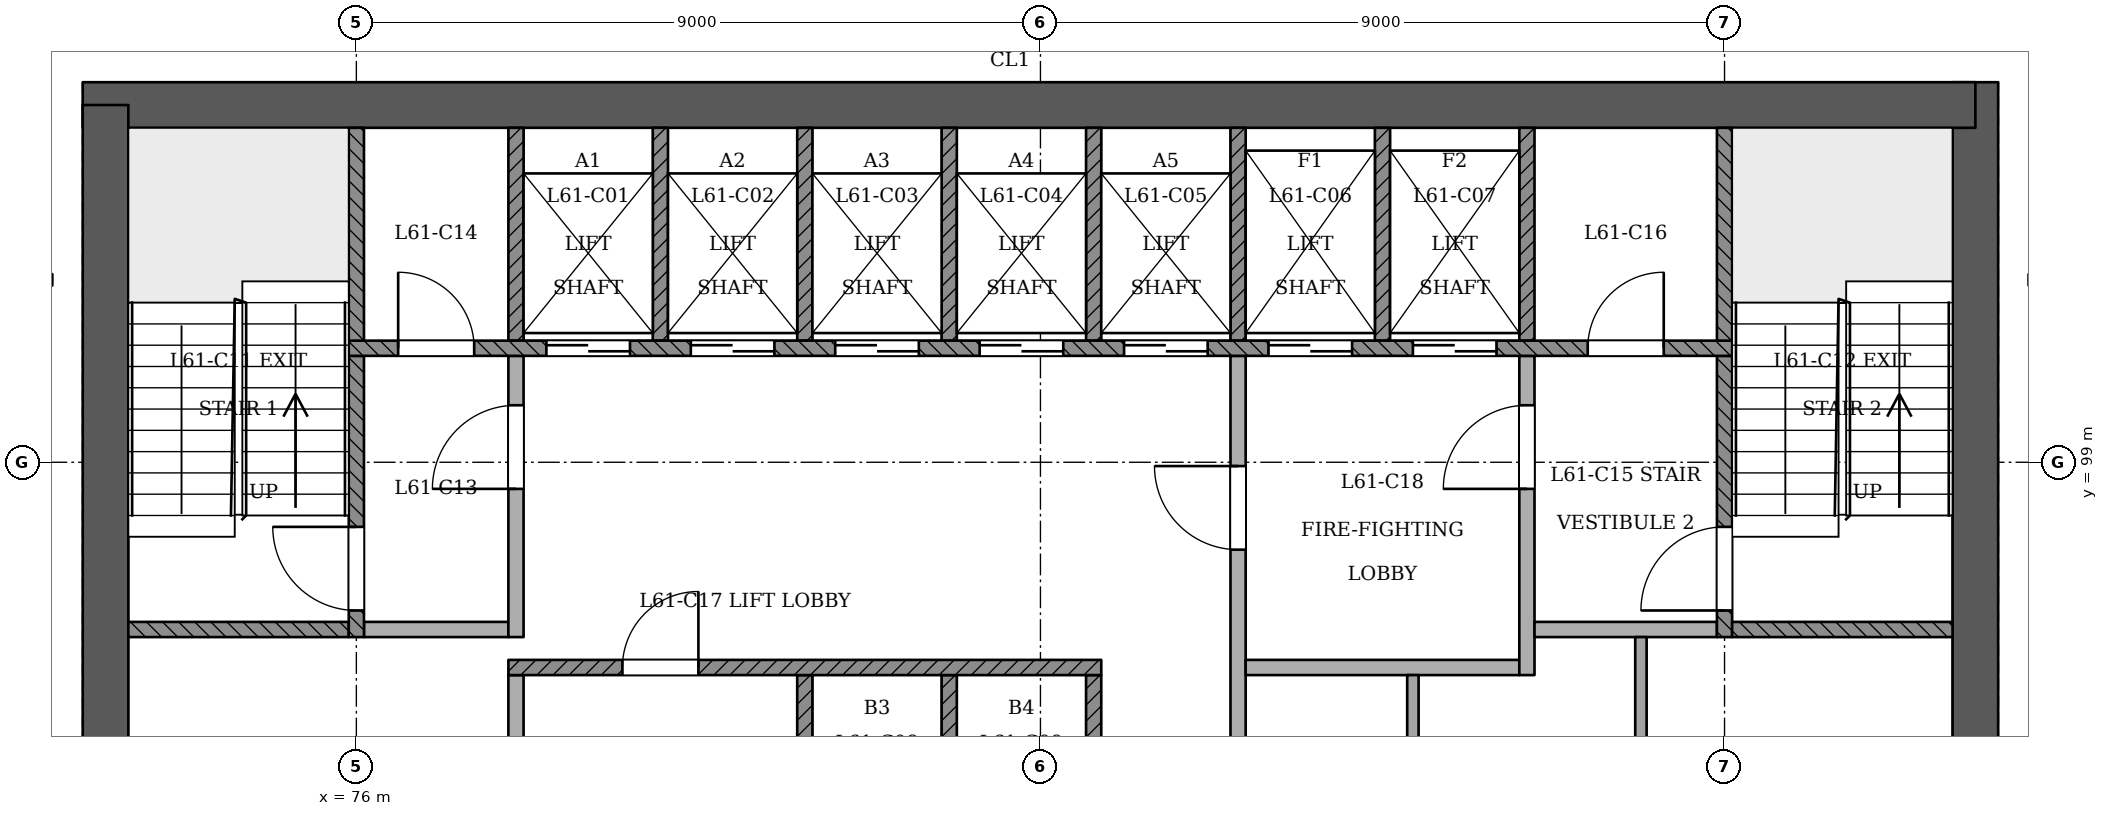
"""IFC4 building model, lengths in metres.
Left out: names, types, materials, properties, quantities, classifications, styles, units other than length and angle.
Written with IfcOpenShell. Run it as: python <this file> out.ifc"""

import sys

from ifc_helpers import new_model, si_unit, direction, frame, frame_2d, origin, place, context, subcontext, project, spatial, rectangle, extrude, element, fill, save


model = new_model("IFC4")
c1 = context("Model", 3, precision=1e-05, world=origin(), true_north=direction((0.0, 1.0)))
c2 = subcontext(c1, "Body", "Model", "MODEL_VIEW")
j1 = project(units=[si_unit("LENGTHUNIT", "METRE"), si_unit("PLANEANGLEUNIT", "RADIAN")], contexts=[c1])
p1 = place(None, origin())
s1 = spatial("IfcSite", under=j1, at=p1, CompositionType="ELEMENT")
p2 = place(p1, origin())
s2 = spatial("IfcBuilding", under=s1, at=p2, CompositionType="ELEMENT")
p3 = place(p2, frame((0.0, 0.0, 239.2)))
s3 = spatial("IfcBuildingStorey", under=s2, at=p3, CompositionType="ELEMENT", Elevation=239.2)
p4 = place(p3, frame((97.3, 93.1, 0.0), z_axis=(0.0, 0.0, 1.0), x_axis=(0.0, 1.0, 0.0)))
e1 = element("IfcWall", 1, at=p4, inside=s3, PredefinedType="SHEAR", context=c2, shape_type="SweptSolid", body=[
    extrude(rectangle(XDim=10.9, YDim=0.6, at=frame_2d((5.45, 0.0))), origin(), (0.0, 0.0, 1.0), 3.6),
])
p5 = place(p3, frame((97.3, 103.7, 0.0), z_axis=(0.0, 0.0, 1.0), x_axis=(-1.0, 0.0, 0.0)))
e2 = element("IfcWall", 2, at=p5, inside=s3, PredefinedType="SHEAR", context=c2, shape_type="SweptSolid", body=[
    extrude(rectangle(XDim=24.9, YDim=0.6, at=frame_2d((12.45, 0.0))), origin(), (0.0, 0.0, 1.0), 3.6),
])
p6 = place(p3, frame((72.7, 103.7, 0.0), z_axis=(0.0, 0.0, 1.0), x_axis=(0.0, -1.0, 0.0)))
e3 = element("IfcWall", 3, at=p6, inside=s3, PredefinedType="SHEAR", context=c2, shape_type="SweptSolid", body=[
    extrude(rectangle(XDim=10.9, YDim=0.6, at=frame_2d((5.45, 0.0))), origin(), (0.0, 0.0, 1.0), 3.6),
])
p7 = place(p3, frame((72.0, 101.4, 0.0), z_axis=(0.0, 0.0, 1.0), x_axis=(-1.0, 0.0, 0.0)))
e4 = element("IfcWall", 4, at=p7, inside=s3, PredefinedType="PARTITIONING", context=c2, shape_type="SweptSolid", body=[
    extrude(rectangle(XDim=1.8, YDim=0.15, at=frame_2d((0.9, 0.0))), origin(), (0.0, 0.0, 1.0), 3.2),
])
p8 = place(p3, frame((78.1, 93.4, 0.0), z_axis=(0.0, 0.0, 1.0), x_axis=(0.0, 1.0, 0.0)))
e5 = element("IfcWall", 5, at=p8, inside=s3, PredefinedType="PARTITIONING", context=c2, shape_type="SweptSolid", body=[
    extrude(rectangle(XDim=2.8, YDim=0.2, at=frame_2d((1.4, 0.0))), origin(), (0.0, 0.0, 1.0), 3.2),
])
for number, where, z_axis, x_axis in (
    (6, (81.9, 93.4, 0.0), (0.0, 0.0, 1.0), (0.0, 1.0, 0.0)),
    (7, (83.8, 93.4, 0.0), (0.0, 0.0, 1.0), (0.0, 1.0, 0.0)),
    (8, (85.7, 93.4, 0.0), (0.0, 0.0, 1.0), (0.0, 1.0, 0.0)),
):
    element("IfcWall", number, at=place(p3, frame(where, z_axis=z_axis, x_axis=x_axis)), inside=s3, PredefinedType="SOLIDWALL", context=c2, shape_type="SweptSolid", body=[
        extrude(rectangle(XDim=2.8, YDim=0.2, at=frame_2d((1.4, 0.0))), origin(), (0.0, 0.0, 1.0), 3.2),
    ])
p9 = place(p3, frame((87.6, 93.4, 0.0), z_axis=(0.0, 0.0, 1.0), x_axis=(0.0, 1.0, 0.0)))
e9 = element("IfcWall", 9, at=p9, inside=s3, PredefinedType="PARTITIONING", context=c2, shape_type="SweptSolid", body=[
    extrude(rectangle(XDim=7.0, YDim=0.2, at=frame_2d((3.5, 0.0))), origin(), (0.0, 0.0, 1.0), 3.2),
])
p10 = place(p9, frame((4.45, 0.0, 0.0)))
e10 = element("IfcOpeningElement", 10, at=p10, cuts=e9, PredefinedType="OPENING", context=c2, shape_type="SweptSolid", body=[
    extrude(rectangle(XDim=1.1, YDim=2.1, at=frame_2d((0.55, 1.05))), frame((0.0, 0.11, 0.0), z_axis=(0.0, -1.0, 0.0), x_axis=(1.0, 0.0, 0.0)), (0.0, 0.0, 1.0), 0.221),
])
p11 = place(p3, frame((89.9, 93.4, 0.0), z_axis=(0.0, 0.0, 1.0), x_axis=(0.0, 1.0, 0.0)))
e11 = element("IfcWall", 11, at=p11, inside=s3, PredefinedType="PARTITIONING", context=c2, shape_type="SweptSolid", body=[
    extrude(rectangle(XDim=2.8, YDim=0.15, at=frame_2d((1.4, 0.0))), origin(), (0.0, 0.0, 1.0), 3.2),
])
p12 = place(p3, frame((92.9, 93.4, 0.0), z_axis=(0.0, 0.0, 1.0), x_axis=(0.0, 1.0, 0.0)))
e12 = element("IfcWall", 12, at=p12, inside=s3, PredefinedType="PARTITIONING", context=c2, shape_type="SweptSolid", body=[
    extrude(rectangle(XDim=3.3, YDim=0.15, at=frame_2d((1.65, 0.0))), origin(), (0.0, 0.0, 1.0), 3.2),
])
p13 = place(p3, frame((78.0, 96.3, 0.0), z_axis=(0.0, 0.0, 1.0), x_axis=(1.0, 0.0, 0.0)))
e13 = element("IfcWall", 13, at=p13, inside=s3, PredefinedType="SOLIDWALL", context=c2, shape_type="SweptSolid", body=[
    extrude(rectangle(XDim=7.8, YDim=0.2, at=frame_2d((3.9, 0.0))), origin(), (0.0, 0.0, 1.0), 3.2),
])
p14 = place(p13, frame((1.5, 0.0, 0.0)))
e14 = element("IfcOpeningElement", 14, at=p14, cuts=e13, PredefinedType="OPENING", context=c2, shape_type="SweptSolid", body=[
    extrude(rectangle(XDim=1.0, YDim=2.1, at=frame_2d((0.5, 1.05))), frame((0.0, 0.11, 0.0), z_axis=(0.0, -1.0, 0.0), x_axis=(1.0, 0.0, 0.0)), (0.0, 0.0, 1.0), 0.221),
])
p15 = place(p3, frame((87.7, 96.3, 0.0), z_axis=(0.0, 0.0, 1.0), x_axis=(1.0, 0.0, 0.0)))
e15 = element("IfcWall", 15, at=p15, inside=s3, PredefinedType="PARTITIONING", context=c2, shape_type="SweptSolid", body=[
    extrude(rectangle(XDim=3.6, YDim=0.2, at=frame_2d((1.8, 0.0))), origin(), (0.0, 0.0, 1.0), 3.2),
])
p16 = place(p3, frame((91.4, 96.2, 0.0), z_axis=(0.0, 0.0, 1.0), x_axis=(0.0, 1.0, 0.0)))
e16 = element("IfcWall", 16, at=p16, inside=s3, PredefinedType="PARTITIONING", context=c2, shape_type="SweptSolid", body=[
    extrude(rectangle(XDim=4.2, YDim=0.2, at=frame_2d((2.1, 0.0))), origin(), (0.0, 0.0, 1.0), 3.2),
])
p17 = place(p16, frame((2.45, 0.0, 0.0)))
e17 = element("IfcOpeningElement", 17, at=p17, cuts=e16, PredefinedType="OPENING", context=c2, shape_type="SweptSolid", body=[
    extrude(rectangle(XDim=1.1, YDim=2.1, at=frame_2d((0.55, 1.05))), frame((0.0, 0.11, 0.0), z_axis=(0.0, -1.0, 0.0), x_axis=(1.0, 0.0, 0.0)), (0.0, 0.0, 1.0), 0.221),
])
p18 = place(p3, frame((73.0, 96.8, 0.0), z_axis=(0.0, 0.0, 1.0), x_axis=(1.0, 0.0, 0.0)))
e18 = element("IfcWall", 18, at=p18, inside=s3, PredefinedType="SOLIDWALL", context=c2, shape_type="SweptSolid", body=[
    extrude(rectangle(XDim=2.9, YDim=0.2, at=frame_2d((1.45, 0.0))), origin(), (0.0, 0.0, 1.0), 3.2),
])
p19 = place(p3, frame((76.0, 96.7, 0.0), z_axis=(0.0, 0.0, 1.0), x_axis=(0.0, 1.0, 0.0)))
e19 = element("IfcWall", 19, at=p19, inside=s3, PredefinedType="SOLIDWALL", context=c2, shape_type="SweptSolid", body=[
    extrude(rectangle(XDim=3.7, YDim=0.2, at=frame_2d((1.85, 0.0))), origin(), (0.0, 0.0, 1.0), 3.2),
])
p20 = place(p19, frame((0.35, 0.0, 0.0)))
e20 = element("IfcOpeningElement", 20, at=p20, cuts=e19, PredefinedType="OPENING", context=c2, shape_type="SweptSolid", body=[
    extrude(rectangle(XDim=1.1, YDim=2.1, at=frame_2d((0.55, 1.05))), frame((0.0, 0.11, 0.0), z_axis=(0.0, -1.0, 0.0), x_axis=(1.0, 0.0, 0.0)), (0.0, 0.0, 1.0), 0.221),
])
p21 = place(p3, frame((76.1, 96.8, 0.0), z_axis=(0.0, 0.0, 1.0), x_axis=(1.0, 0.0, 0.0)))
e21 = element("IfcWall", 21, at=p21, inside=s3, PredefinedType="PARTITIONING", context=c2, shape_type="SweptSolid", body=[
    extrude(rectangle(XDim=1.9, YDim=0.2, at=frame_2d((0.95, 0.0))), origin(), (0.0, 0.0, 1.0), 3.2),
])
p22 = place(p3, frame((78.1, 96.7, 0.0), z_axis=(0.0, 0.0, 1.0), x_axis=(0.0, 1.0, 0.0)))
e22 = element("IfcWall", 22, at=p22, inside=s3, PredefinedType="PARTITIONING", context=c2, shape_type="SweptSolid", body=[
    extrude(rectangle(XDim=3.7, YDim=0.2, at=frame_2d((1.85, 0.0))), origin(), (0.0, 0.0, 1.0), 3.2),
])
p23 = place(p22, frame((1.95, 0.0, 0.0)))
e23 = element("IfcOpeningElement", 23, at=p23, cuts=e22, PredefinedType="OPENING", context=c2, shape_type="SweptSolid", body=[
    extrude(rectangle(XDim=1.1, YDim=2.1, at=frame_2d((0.55, 1.05))), frame((0.0, 0.11, 0.0), z_axis=(0.0, -1.0, 0.0), x_axis=(1.0, 0.0, 0.0)), (0.0, 0.0, 1.0), 0.221),
])
p24 = place(p3, frame((91.5, 96.8, 0.0), z_axis=(0.0, 0.0, 1.0), x_axis=(1.0, 0.0, 0.0)))
e24 = element("IfcWall", 24, at=p24, inside=s3, PredefinedType="PARTITIONING", context=c2, shape_type="SweptSolid", body=[
    extrude(rectangle(XDim=2.4, YDim=0.2, at=frame_2d((1.2, 0.0))), origin(), (0.0, 0.0, 1.0), 3.2),
])
p25 = place(p3, frame((94.0, 96.7, 0.0), z_axis=(0.0, 0.0, 1.0), x_axis=(0.0, 1.0, 0.0)))
e25 = element("IfcWall", 25, at=p25, inside=s3, PredefinedType="SOLIDWALL", context=c2, shape_type="SweptSolid", body=[
    extrude(rectangle(XDim=3.7, YDim=0.2, at=frame_2d((1.85, 0.0))), origin(), (0.0, 0.0, 1.0), 3.2),
])
p26 = place(p25, frame((0.35, 0.0, 0.0)))
e26 = element("IfcOpeningElement", 26, at=p26, cuts=e25, PredefinedType="OPENING", context=c2, shape_type="SweptSolid", body=[
    extrude(rectangle(XDim=1.1, YDim=2.1, at=frame_2d((0.55, 1.05))), frame((0.0, 0.11, 0.0), z_axis=(0.0, -1.0, 0.0), x_axis=(1.0, 0.0, 0.0)), (0.0, 0.0, 1.0), 0.221),
])
p27 = place(p3, frame((94.1, 96.8, 0.0), z_axis=(0.0, 0.0, 1.0), x_axis=(1.0, 0.0, 0.0)))
e27 = element("IfcWall", 27, at=p27, inside=s3, PredefinedType="SOLIDWALL", context=c2, shape_type="SweptSolid", body=[
    extrude(rectangle(XDim=2.9, YDim=0.2, at=frame_2d((1.45, 0.0))), origin(), (0.0, 0.0, 1.0), 3.2),
])
p28 = place(p3, frame((75.9, 100.5, 0.0), z_axis=(0.0, 0.0, 1.0), x_axis=(1.0, 0.0, 0.0)))
e28 = element("IfcWall", 28, at=p28, inside=s3, PredefinedType="SOLIDWALL", context=c2, shape_type="SweptSolid", body=[
    extrude(rectangle(XDim=18.2, YDim=0.2, at=frame_2d((9.1, 0.0))), origin(), (0.0, 0.0, 1.0), 3.2),
])
p29 = place(p28, frame((2.6, 0.0, 0.0)))
e29 = element("IfcOpeningElement", 29, at=p29, cuts=e28, PredefinedType="OPENING", context=c2, shape_type="SweptSolid", body=[
    extrude(rectangle(XDim=1.1, YDim=2.1, at=frame_2d((0.55, 1.05))), frame((0.0, 0.11, 0.0), z_axis=(0.0, -1.0, 0.0), x_axis=(1.0, 0.0, 0.0)), (0.0, 0.0, 1.0), 0.221),
])
p30 = place(p28, frame((4.5, 0.0, 0.0)))
e30 = element("IfcOpeningElement", 30, at=p30, cuts=e28, PredefinedType="OPENING", context=c2, shape_type="SweptSolid", body=[
    extrude(rectangle(XDim=1.1, YDim=2.1, at=frame_2d((0.55, 1.05))), frame((0.0, 0.11, 0.0), z_axis=(0.0, -1.0, 0.0), x_axis=(1.0, 0.0, 0.0)), (0.0, 0.0, 1.0), 0.221),
])
p31 = place(p28, frame((6.4, 0.0, 0.0)))
e31 = element("IfcOpeningElement", 31, at=p31, cuts=e28, PredefinedType="OPENING", context=c2, shape_type="SweptSolid", body=[
    extrude(rectangle(XDim=1.1, YDim=2.1, at=frame_2d((0.55, 1.05))), frame((0.0, 0.11, 0.0), z_axis=(0.0, -1.0, 0.0), x_axis=(1.0, 0.0, 0.0)), (0.0, 0.0, 1.0), 0.221),
])
p32 = place(p28, frame((8.3, 0.0, 0.0)))
e32 = element("IfcOpeningElement", 32, at=p32, cuts=e28, PredefinedType="OPENING", context=c2, shape_type="SweptSolid", body=[
    extrude(rectangle(XDim=1.1, YDim=2.1, at=frame_2d((0.55, 1.05))), frame((0.0, 0.11, 0.0), z_axis=(0.0, -1.0, 0.0), x_axis=(1.0, 0.0, 0.0)), (0.0, 0.0, 1.0), 0.221),
])
p33 = place(p28, frame((10.2, 0.0, 0.0)))
e33 = element("IfcOpeningElement", 33, at=p33, cuts=e28, PredefinedType="OPENING", context=c2, shape_type="SweptSolid", body=[
    extrude(rectangle(XDim=1.1, YDim=2.1, at=frame_2d((0.55, 1.05))), frame((0.0, 0.11, 0.0), z_axis=(0.0, -1.0, 0.0), x_axis=(1.0, 0.0, 0.0)), (0.0, 0.0, 1.0), 0.221),
])
p34 = place(p28, frame((12.1, 0.0, 0.0)))
e34 = element("IfcOpeningElement", 34, at=p34, cuts=e28, PredefinedType="OPENING", context=c2, shape_type="SweptSolid", body=[
    extrude(rectangle(XDim=1.1, YDim=2.1, at=frame_2d((0.55, 1.05))), frame((0.0, 0.11, 0.0), z_axis=(0.0, -1.0, 0.0), x_axis=(1.0, 0.0, 0.0)), (0.0, 0.0, 1.0), 0.221),
])
p35 = place(p28, frame((14.0, 0.0, 0.0)))
e35 = element("IfcOpeningElement", 35, at=p35, cuts=e28, PredefinedType="OPENING", context=c2, shape_type="SweptSolid", body=[
    extrude(rectangle(XDim=1.1, YDim=2.1, at=frame_2d((0.55, 1.05))), frame((0.0, 0.11, 0.0), z_axis=(0.0, -1.0, 0.0), x_axis=(1.0, 0.0, 0.0)), (0.0, 0.0, 1.0), 0.221),
])
p36 = place(p28, frame((0.65, 0.0, 0.0)))
e36 = element("IfcOpeningElement", 36, at=p36, cuts=e28, PredefinedType="OPENING", context=c2, shape_type="SweptSolid", body=[
    extrude(rectangle(XDim=1.0, YDim=2.1, at=frame_2d((0.5, 1.05))), frame((0.0, 0.11, 0.0), z_axis=(0.0, -1.0, 0.0), x_axis=(1.0, 0.0, 0.0)), (0.0, 0.0, 1.0), 0.221),
])
p37 = place(p28, frame((16.3, 0.0, 0.0)))
e37 = element("IfcOpeningElement", 37, at=p37, cuts=e28, PredefinedType="OPENING", context=c2, shape_type="SweptSolid", body=[
    extrude(rectangle(XDim=1.0, YDim=2.1, at=frame_2d((0.5, 1.05))), frame((0.0, 0.11, 0.0), z_axis=(0.0, -1.0, 0.0), x_axis=(1.0, 0.0, 0.0)), (0.0, 0.0, 1.0), 0.221),
])
for number, where, z_axis, x_axis in (
    (38, (76.0, 100.6, 0.0), (0.0, 0.0, 1.0), (0.0, 1.0, 0.0)),
    (39, (78.1, 100.6, 0.0), (0.0, 0.0, 1.0), (0.0, 1.0, 0.0)),
    (40, (80.0, 100.6, 0.0), (0.0, 0.0, 1.0), (0.0, 1.0, 0.0)),
    (41, (81.9, 100.6, 0.0), (0.0, 0.0, 1.0), (0.0, 1.0, 0.0)),
    (42, (83.8, 100.6, 0.0), (0.0, 0.0, 1.0), (0.0, 1.0, 0.0)),
    (43, (85.7, 100.6, 0.0), (0.0, 0.0, 1.0), (0.0, 1.0, 0.0)),
    (44, (87.6, 100.6, 0.0), (0.0, 0.0, 1.0), (0.0, 1.0, 0.0)),
    (45, (89.5, 100.6, 0.0), (0.0, 0.0, 1.0), (0.0, 1.0, 0.0)),
    (46, (91.4, 100.6, 0.0), (0.0, 0.0, 1.0), (0.0, 1.0, 0.0)),
    (47, (94.0, 100.6, 0.0), (0.0, 0.0, 1.0), (0.0, 1.0, 0.0)),
):
    element("IfcWall", number, at=place(p3, frame(where, z_axis=z_axis, x_axis=x_axis)), inside=s3, PredefinedType="SOLIDWALL", context=c2, shape_type="SweptSolid", body=[
        extrude(rectangle(XDim=2.8, YDim=0.2, at=frame_2d((1.4, 0.0))), origin(), (0.0, 0.0, 1.0), 3.2),
    ])
p38 = place(p29, origin())
e48 = element("IfcDoor", 48, at=p38, inside=s3, OperationType="SLIDING_TO_RIGHT", PredefinedType="NOTDEFINED", context=c2, shape_type="SweptSolid", body=[
    extrude(rectangle(XDim=1.1, YDim=2.1, at=frame_2d((0.55, 1.05))), frame((0.0, 0.025, 0.0), z_axis=(0.0, -1.0, 0.0), x_axis=(1.0, 0.0, 0.0)), (0.0, 0.0, 1.0), 0.05),
])
fill(e29, e48)
p39 = place(p30, origin())
e49 = element("IfcDoor", 49, at=p39, inside=s3, OperationType="SLIDING_TO_LEFT", PredefinedType="NOTDEFINED", context=c2, shape_type="SweptSolid", body=[
    extrude(rectangle(XDim=1.1, YDim=2.1, at=frame_2d((0.55, 1.05))), frame((0.0, 0.025, 0.0), z_axis=(0.0, -1.0, 0.0), x_axis=(1.0, 0.0, 0.0)), (0.0, 0.0, 1.0), 0.05),
])
fill(e30, e49)
p40 = place(p31, origin())
e50 = element("IfcDoor", 50, at=p40, inside=s3, OperationType="SLIDING_TO_RIGHT", PredefinedType="NOTDEFINED", context=c2, shape_type="SweptSolid", body=[
    extrude(rectangle(XDim=1.1, YDim=2.1, at=frame_2d((0.55, 1.05))), frame((0.0, 0.025, 0.0), z_axis=(0.0, -1.0, 0.0), x_axis=(1.0, 0.0, 0.0)), (0.0, 0.0, 1.0), 0.05),
])
fill(e31, e50)
p41 = place(p32, origin())
e51 = element("IfcDoor", 51, at=p41, inside=s3, OperationType="SLIDING_TO_LEFT", PredefinedType="NOTDEFINED", context=c2, shape_type="SweptSolid", body=[
    extrude(rectangle(XDim=1.1, YDim=2.1, at=frame_2d((0.55, 1.05))), frame((0.0, 0.025, 0.0), z_axis=(0.0, -1.0, 0.0), x_axis=(1.0, 0.0, 0.0)), (0.0, 0.0, 1.0), 0.05),
])
fill(e32, e51)
p42 = place(p33, origin())
e52 = element("IfcDoor", 52, at=p42, inside=s3, OperationType="SLIDING_TO_RIGHT", PredefinedType="NOTDEFINED", context=c2, shape_type="SweptSolid", body=[
    extrude(rectangle(XDim=1.1, YDim=2.1, at=frame_2d((0.55, 1.05))), frame((0.0, 0.025, 0.0), z_axis=(0.0, -1.0, 0.0), x_axis=(1.0, 0.0, 0.0)), (0.0, 0.0, 1.0), 0.05),
])
fill(e33, e52)
p43 = place(p34, origin())
e53 = element("IfcDoor", 53, at=p43, inside=s3, OperationType="SLIDING_TO_RIGHT", PredefinedType="NOTDEFINED", context=c2, shape_type="SweptSolid", body=[
    extrude(rectangle(XDim=1.1, YDim=2.1, at=frame_2d((0.55, 1.05))), frame((0.0, 0.025, 0.0), z_axis=(0.0, -1.0, 0.0), x_axis=(1.0, 0.0, 0.0)), (0.0, 0.0, 1.0), 0.05),
])
fill(e34, e53)
p44 = place(p35, origin())
e54 = element("IfcDoor", 54, at=p44, inside=s3, OperationType="SLIDING_TO_LEFT", PredefinedType="NOTDEFINED", context=c2, shape_type="SweptSolid", body=[
    extrude(rectangle(XDim=1.1, YDim=2.1, at=frame_2d((0.55, 1.05))), frame((0.0, 0.025, 0.0), z_axis=(0.0, -1.0, 0.0), x_axis=(1.0, 0.0, 0.0)), (0.0, 0.0, 1.0), 0.05),
])
fill(e35, e54)
p45 = place(p20, origin())
e55 = element("IfcDoor", 55, at=p45, inside=s3, OperationType="SINGLE_SWING_RIGHT", PredefinedType="NOTDEFINED", context=c2, shape_type="SweptSolid", body=[
    extrude(rectangle(XDim=1.1, YDim=2.1, at=frame_2d((0.55, 1.05))), frame((0.0, 0.025, 0.0), z_axis=(0.0, -1.0, 0.0), x_axis=(1.0, 0.0, 0.0)), (0.0, 0.0, 1.0), 0.05),
])
fill(e20, e55)
p46 = place(p26, origin())
e56 = element("IfcDoor", 56, at=p46, inside=s3, OperationType="SINGLE_SWING_LEFT", PredefinedType="NOTDEFINED", context=c2, shape_type="SweptSolid", body=[
    extrude(rectangle(XDim=1.1, YDim=2.1, at=frame_2d((0.55, 1.05))), frame((0.0, 0.025, 0.0), z_axis=(0.0, -1.0, 0.0), x_axis=(1.0, 0.0, 0.0)), (0.0, 0.0, 1.0), 0.05),
])
fill(e26, e56)
p47 = place(p23, origin())
e57 = element("IfcDoor", 57, at=p47, inside=s3, OperationType="SINGLE_SWING_LEFT", PredefinedType="NOTDEFINED", context=c2, shape_type="SweptSolid", body=[
    extrude(rectangle(XDim=1.1, YDim=2.1, at=frame_2d((0.55, 1.05))), frame((0.0, 0.025, 0.0), z_axis=(0.0, -1.0, 0.0), x_axis=(1.0, 0.0, 0.0)), (0.0, 0.0, 1.0), 0.05),
])
fill(e23, e57)
p48 = place(p10, origin())
e58 = element("IfcDoor", 58, at=p48, inside=s3, OperationType="SINGLE_SWING_RIGHT", PredefinedType="NOTDEFINED", context=c2, shape_type="SweptSolid", body=[
    extrude(rectangle(XDim=1.1, YDim=2.1, at=frame_2d((0.55, 1.05))), frame((0.0, 0.025, 0.0), z_axis=(0.0, -1.0, 0.0), x_axis=(1.0, 0.0, 0.0)), (0.0, 0.0, 1.0), 0.05),
])
fill(e10, e58)
p49 = place(p17, origin())
e59 = element("IfcDoor", 59, at=p49, inside=s3, OperationType="SINGLE_SWING_LEFT", PredefinedType="NOTDEFINED", context=c2, shape_type="SweptSolid", body=[
    extrude(rectangle(XDim=1.1, YDim=2.1, at=frame_2d((0.55, 1.05))), frame((0.0, 0.025, 0.0), z_axis=(0.0, -1.0, 0.0), x_axis=(1.0, 0.0, 0.0)), (0.0, 0.0, 1.0), 0.05),
])
fill(e17, e59)
p50 = place(p36, origin())
e60 = element("IfcDoor", 60, at=p50, inside=s3, OperationType="SINGLE_SWING_LEFT", PredefinedType="NOTDEFINED", context=c2, shape_type="SweptSolid", body=[
    extrude(rectangle(XDim=1.0, YDim=2.1, at=frame_2d((0.5, 1.05))), frame((0.0, 0.025, 0.0), z_axis=(0.0, -1.0, 0.0), x_axis=(1.0, 0.0, 0.0)), (0.0, 0.0, 1.0), 0.05),
])
fill(e36, e60)
p51 = place(p37, origin())
e61 = element("IfcDoor", 61, at=p51, inside=s3, OperationType="SINGLE_SWING_RIGHT", PredefinedType="NOTDEFINED", context=c2, shape_type="SweptSolid", body=[
    extrude(rectangle(XDim=1.0, YDim=2.1, at=frame_2d((0.5, 1.05))), frame((0.0, 0.025, 0.0), z_axis=(0.0, -1.0, 0.0), x_axis=(1.0, 0.0, 0.0)), (0.0, 0.0, 1.0), 0.05),
])
fill(e37, e61)
p52 = place(p14, origin())
e62 = element("IfcDoor", 62, at=p52, inside=s3, OperationType="SINGLE_SWING_RIGHT", PredefinedType="NOTDEFINED", context=c2, shape_type="SweptSolid", body=[
    extrude(rectangle(XDim=1.0, YDim=2.1, at=frame_2d((0.5, 1.05))), frame((0.0, 0.025, 0.0), z_axis=(0.0, -1.0, 0.0), x_axis=(1.0, 0.0, 0.0)), (0.0, 0.0, 1.0), 0.05),
])
fill(e14, e62)
save(model, sys.argv[1])
